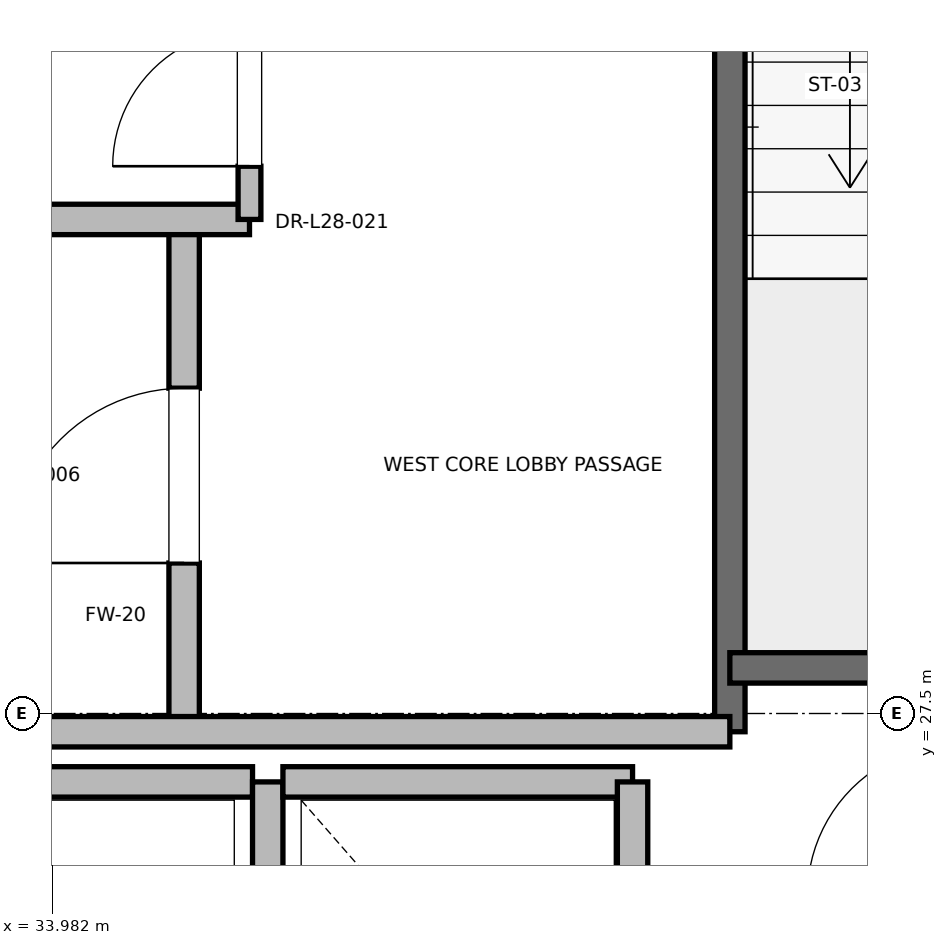
"""IFC4 building model, lengths in metres.
Left out: names, types, materials, properties, quantities, classifications, styles, units other than length and angle.
Written with IfcOpenShell. Run it as: python <this file> out.ifc"""

import sys

from ifc_helpers import new_model, si_unit, direction, frame, frame_2d, origin, place, context, subcontext, project, spatial, rectangle, extrude, element, fill, save


model = new_model("IFC4")
c1 = context("Model", 3, precision=1e-05, world=origin(), true_north=direction((0.0, 1.0)))
c2 = subcontext(c1, "Body", "Model", "MODEL_VIEW")
j1 = project(units=[si_unit("LENGTHUNIT", "METRE"), si_unit("PLANEANGLEUNIT", "RADIAN")], contexts=[c1])
p1 = place(None, origin())
s1 = spatial("IfcSite", under=j1, at=p1, CompositionType="ELEMENT")
p2 = place(p1, origin())
s2 = spatial("IfcBuilding", under=s1, at=p2, CompositionType="ELEMENT")
p3 = place(p2, frame((0.0, 0.0, 123.4)))
s3 = spatial("IfcBuildingStorey", under=s2, at=p3, CompositionType="ELEMENT", Elevation=123.4)
p4 = place(p3, frame((38.44, 27.38, 0.0), z_axis=(0.0, 0.0, 1.0), x_axis=(0.0, 1.0, 0.0)))
e1 = element("IfcWall", 1, at=p4, inside=s3, PredefinedType="SOLIDWALL", context=c2, shape_type="SweptSolid", body=[
    extrude(rectangle(XDim=8.87, YDim=0.2, at=frame_2d((4.435, 0.0))), origin(), (0.0, 0.0, 1.0), 4.775),
])
p5 = place(p3, frame((38.44, 27.8, 0.0), z_axis=(0.0, 0.0, 1.0), x_axis=(1.0, 0.0, 0.0)))
e2 = element("IfcWall", 2, at=p5, inside=s3, PredefinedType="SOLIDWALL", context=c2, shape_type="SweptSolid", body=[
    extrude(rectangle(XDim=3.32, YDim=0.2, at=frame_2d((1.66, 0.0))), origin(), (0.0, 0.0, 1.0), 4.775),
])
p6 = place(p3, frame((34.85, 27.38, 0.0), z_axis=(0.0, 0.0, 1.0), x_axis=(0.0, 1.0, 0.0)))
e3 = element("IfcWall", 3, at=p6, inside=s3, PredefinedType="PARTITIONING", context=c2, shape_type="SweptSolid", body=[
    extrude(rectangle(XDim=3.37, YDim=0.2, at=frame_2d((1.685, 0.0))), origin(), (0.0, 0.0, 1.0), 4.775),
])
p7 = place(p6, frame((1.11, 0.0, 0.0)))
e4 = element("IfcOpeningElement", 4, at=p7, cuts=e3, PredefinedType="OPENING", context=c2, shape_type="SweptSolid", body=[
    extrude(rectangle(XDim=1.15, YDim=2.2, at=frame_2d((0.575, 1.1))), frame((0.0, 0.1, 0.0), z_axis=(0.0, -1.0, 0.0), x_axis=(1.0, 0.0, 0.0)), (0.0, 0.0, 1.0), 0.2),
])
p8 = place(p3, frame((32.82, 27.38, 0.0), z_axis=(0.0, 0.0, 1.0), x_axis=(1.0, 0.0, 0.0)))
e5 = element("IfcWall", 5, at=p8, inside=s3, PredefinedType="PARTITIONING", context=c2, shape_type="SweptSolid", body=[
    extrude(rectangle(XDim=5.62, YDim=0.2, at=frame_2d((2.81, 0.0))), origin(), (0.0, 0.0, 1.0), 4.775),
])
p9 = place(p3, frame((32.15, 30.75, 0.0), z_axis=(0.0, 0.0, 1.0), x_axis=(1.0, 0.0, 0.0)))
e6 = element("IfcWall", 6, at=p9, inside=s3, PredefinedType="PARTITIONING", context=c2, shape_type="SweptSolid", body=[
    extrude(rectangle(XDim=3.13, YDim=0.2, at=frame_2d((1.565, 0.0))), origin(), (0.0, 0.0, 1.0), 4.775),
])
p10 = place(p3, frame((35.3, 27.05, 0.0), z_axis=(0.0, 0.0, 1.0), x_axis=(-1.0, 0.0, 0.0)))
e7 = element("IfcWall", 7, at=p10, inside=s3, PredefinedType="SOLIDWALL", context=c2, shape_type="SweptSolid", body=[
    extrude(rectangle(XDim=2.3, YDim=0.2, at=frame_2d((1.15, 0.0))), origin(), (0.0, 0.0, 1.0), 4.775),
])
p11 = place(p3, frame((35.4, 24.45, 0.0), z_axis=(0.0, 0.0, 1.0), x_axis=(0.0, 1.0, 0.0)))
e8 = element("IfcWall", 8, at=p11, inside=s3, PredefinedType="SOLIDWALL", context=c2, shape_type="SweptSolid", body=[
    extrude(rectangle(XDim=2.6, YDim=0.2, at=frame_2d((1.3, 0.0))), origin(), (0.0, 0.0, 1.0), 4.775),
])
p12 = place(p3, frame((37.8, 27.05, 0.0), z_axis=(0.0, 0.0, 1.0), x_axis=(-1.0, 0.0, 0.0)))
e9 = element("IfcWall", 9, at=p12, inside=s3, PredefinedType="SOLIDWALL", context=c2, shape_type="SweptSolid", body=[
    extrude(rectangle(XDim=2.3, YDim=0.2, at=frame_2d((1.15, 0.0))), origin(), (0.0, 0.0, 1.0), 4.775),
])
p13 = place(p3, frame((37.8, 24.45, 0.0), z_axis=(0.0, 0.0, 1.0), x_axis=(0.0, 1.0, 0.0)))
e10 = element("IfcWall", 10, at=p13, inside=s3, PredefinedType="SOLIDWALL", context=c2, shape_type="SweptSolid", body=[
    extrude(rectangle(XDim=2.6, YDim=0.2, at=frame_2d((1.3, 0.0))), origin(), (0.0, 0.0, 1.0), 4.775),
])
p14 = place(p3, frame((35.28, 30.75, 0.0), z_axis=(0.0, 0.0, 1.0), x_axis=(0.0, 1.0, 0.0)))
e11 = element("IfcWall", 11, at=p14, inside=s3, PredefinedType="PARTITIONING", context=c2, shape_type="SweptSolid", body=[
    extrude(rectangle(XDim=1.6, YDim=0.15, at=frame_2d((0.8, 0.0))), origin(), (0.0, 0.0, 1.0), 2.85),
])
p15 = place(p14, frame((0.35, 0.0, 0.0)))
e12 = element("IfcOpeningElement", 12, at=p15, cuts=e11, PredefinedType="OPENING", context=c2, shape_type="SweptSolid", body=[
    extrude(rectangle(XDim=0.9, YDim=2.1, at=frame_2d((0.45, 1.05))), frame((0.0, 0.075, 0.0), z_axis=(0.0, -1.0, 0.0), x_axis=(1.0, 0.0, 0.0)), (0.0, 0.0, 1.0), 0.15),
])
p16 = place(p7, origin())
e13 = element("IfcDoor", 13, at=p16, inside=s3, OperationType="SINGLE_SWING_LEFT", PredefinedType="DOOR", context=c2, shape_type="SweptSolid", body=[
    extrude(rectangle(XDim=1.15, YDim=2.2, at=frame_2d((0.575, 1.1))), frame((0.0, 0.025, 0.0), z_axis=(0.0, -1.0, 0.0), x_axis=(1.0, 0.0, 0.0)), (0.0, 0.0, 1.0), 0.05),
])
fill(e4, e13)
p17 = place(p15, origin())
e14 = element("IfcDoor", 14, at=p17, inside=s3, OperationType="SINGLE_SWING_LEFT", PredefinedType="DOOR", context=c2, shape_type="SweptSolid", body=[
    extrude(rectangle(XDim=0.9, YDim=2.1, at=frame_2d((0.45, 1.05))), frame((0.0, 0.025, 0.0), z_axis=(0.0, -1.0, 0.0), x_axis=(1.0, 0.0, 0.0)), (0.0, 0.0, 1.0), 0.05),
])
fill(e12, e14)
save(model, sys.argv[1])
